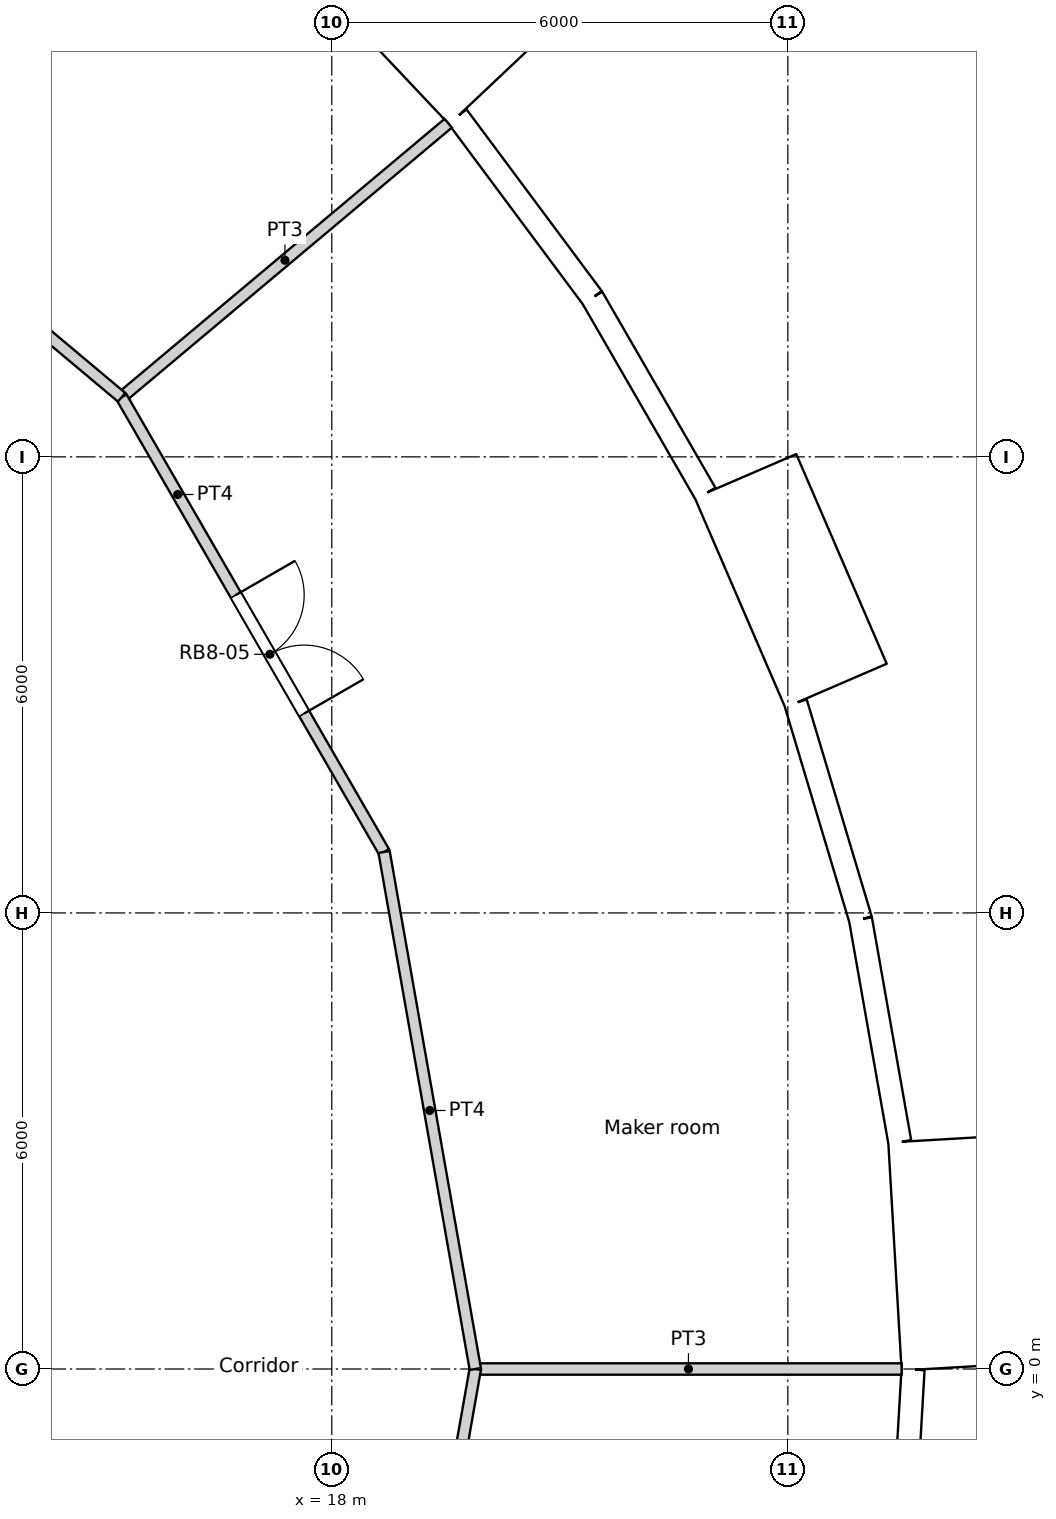
"""IFC4 building model, lengths in metres.
Left out: names, types, materials, properties, quantities, classifications, styles, units other than length and angle.
Written with IfcOpenShell. Run it as: python <this file> out.ifc"""

import sys

from ifc_helpers import new_model, si_unit, direction, frame, frame_2d, origin, origin_2d, place, context, subcontext, project, spatial, rectangle, circle, extrude, element, fill, save


model = new_model("IFC4")
c1 = context("Model", 3, precision=1e-05, world=origin(), true_north=direction((0.0, 1.0)))
c2 = subcontext(c1, "Body", "Model", "MODEL_VIEW")
j1 = project(units=[si_unit("LENGTHUNIT", "METRE"), si_unit("PLANEANGLEUNIT", "RADIAN")], contexts=[c1])
p1 = place(None, origin())
s1 = spatial("IfcSite", under=j1, at=p1, CompositionType="ELEMENT")
p2 = place(p1, origin())
s2 = spatial("IfcBuilding", under=s1, at=p2, CompositionType="ELEMENT")
p3 = place(p2, frame((0.0, 0.0, 201.6)))
s3 = spatial("IfcBuildingStorey", under=s2, at=p3, CompositionType="ELEMENT", Elevation=201.6)
for number, where, z_axis, x_axis in (
    (1, (24.548, 0.0, 0.0), (0.0, 0.0, 1.0), (1.0, 0.0, 0.0)),
    (2, (23.886, 5.661, 0.0), (0.0, 0.0, 1.0), (1.0, 0.0, 0.0)),
    (3, (21.937, 11.017, 0.0), (0.0, 0.0, 1.0), (1.0, 0.0, 0.0)),
    (4, (18.805, 15.779, 0.0), (0.0, 0.0, 1.0), (1.0, 0.0, 0.0)),
):
    element("IfcColumn", number, at=place(p3, frame(where, z_axis=z_axis, x_axis=x_axis)), inside=s3, PredefinedType="COLUMN", context=c2, shape_type="SweptSolid", body=[
        extrude(circle(Radius=0.6, at=origin_2d()), origin(), (0.0, 0.0, 1.0), 3.6),
    ])
for number, where, z_axis, x_axis in (
    (5, (18.822, 0.0, 0.0), (0.0, 0.0, 1.0), (1.0, 0.0, 0.0)),
    (6, (17.986, 5.548, 0.0), (0.0, 0.0, 1.0), (1.0, 0.0, 0.0)),
    (7, (15.552, 10.603, 0.0), (0.0, 0.0, 1.0), (1.0, 0.0, 0.0)),
):
    element("IfcColumn", number, at=place(p3, frame(where, z_axis=z_axis, x_axis=x_axis)), inside=s3, PredefinedType="COLUMN", context=c2, shape_type="SweptSolid", body=[
        extrude(circle(Radius=0.65, at=origin_2d()), origin(), (0.0, 0.0, 1.0), 3.6),
    ])
p4 = place(p3, frame((26.222, 0.025, -0.3), z_axis=(0.0, 0.0, 1.0), x_axis=(-0.058106596105, 0.998310384344, 0.0)))
e8 = element("IfcWall", 8, at=p4, inside=s3, PredefinedType="ELEMENTEDWALL", context=c2, shape_type="SweptSolid", body=[
    extrude(rectangle(XDim=3.0, YDim=1.45, at=frame_2d((1.5, 0.0))), origin(), (0.0, 0.0, 1.0), 3.6),
])
p5 = place(p4, frame((1.5, 0.0, 1.85)))
e9 = element("IfcOpeningElement", 9, at=p5, cuts=e8, PredefinedType="OPENING", context=c2, shape_type="SweptSolid", body=[
    extrude(circle(Radius=0.9, at=origin_2d()), frame((0.0, 0.735, 0.0), z_axis=(0.0, -1.0, 0.0), x_axis=(1.0, 0.0, 0.0)), (0.0, 0.0, 1.0), 1.47),
])
p6 = place(p3, frame((25.472, 2.987, 0.0), z_axis=(0.0, 0.0, 1.0), x_axis=(-0.173686952598, 0.984800915159, 0.0)))
e10 = element("IfcWall", 10, at=p6, inside=s3, PredefinedType="SOLIDWALL", context=c2, shape_type="SweptSolid", body=[
    extrude(rectangle(XDim=2.973, YDim=0.3, at=frame_2d((1.486, 0.0))), origin(), (0.0, 0.0, 1.0), 3.3),
])
p7 = place(p6, frame((1.486, 0.0, 1.55)))
e11 = element("IfcOpeningElement", 11, at=p7, cuts=e10, PredefinedType="OPENING", context=c2, shape_type="SweptSolid", body=[
    extrude(circle(Radius=0.9, at=origin_2d()), frame((0.0, 0.16, 0.0), z_axis=(0.0, -1.0, 0.0), x_axis=(1.0, 0.0, 0.0)), (0.0, 0.0, 1.0), 0.32),
])
p8 = place(p3, frame((24.956, 5.915, 0.0), z_axis=(0.0, 0.0, 1.0), x_axis=(-0.286782750849, 0.957995643944, 0.0)))
e12 = element("IfcWall", 12, at=p8, inside=s3, PredefinedType="SOLIDWALL", context=c2, shape_type="SweptSolid", body=[
    extrude(rectangle(XDim=2.973, YDim=0.3, at=frame_2d((1.486, 0.0))), origin(), (0.0, 0.0, 1.0), 3.3),
])
p9 = place(p8, frame((1.486, 0.0, 1.55)))
e13 = element("IfcOpeningElement", 13, at=p9, cuts=e12, PredefinedType="OPENING", context=c2, shape_type="SweptSolid", body=[
    extrude(circle(Radius=0.9, at=origin_2d()), frame((0.0, 0.16, 0.0), z_axis=(0.0, -1.0, 0.0), x_axis=(1.0, 0.0, 0.0)), (0.0, 0.0, 1.0), 0.32),
])
p10 = place(p3, frame((24.632, 8.992, -0.3), z_axis=(0.0, 0.0, 1.0), x_axis=(-0.396079003245, 0.918216435917, 0.0)))
e14 = element("IfcWall", 14, at=p10, inside=s3, PredefinedType="ELEMENTEDWALL", context=c2, shape_type="SweptSolid", body=[
    extrude(rectangle(XDim=3.0, YDim=1.45, at=frame_2d((1.5, 0.0))), origin(), (0.0, 0.0, 1.0), 3.6),
])
p11 = place(p10, frame((1.5, 0.0, 1.85)))
e15 = element("IfcOpeningElement", 15, at=p11, cuts=e14, PredefinedType="OPENING", context=c2, shape_type="SweptSolid", body=[
    extrude(circle(Radius=0.9, at=origin_2d()), frame((0.0, 0.735, 0.0), z_axis=(0.0, -1.0, 0.0), x_axis=(1.0, 0.0, 0.0)), (0.0, 0.0, 1.0), 1.47),
])
p12 = place(p3, frame((22.915, 11.519, 0.0), z_axis=(0.0, 0.0, 1.0), x_axis=(-0.499954672104, 0.866051572276, 0.0)))
e16 = element("IfcWall", 16, at=p12, inside=s3, PredefinedType="SOLIDWALL", context=c2, shape_type="SweptSolid", body=[
    extrude(rectangle(XDim=2.973, YDim=0.3, at=frame_2d((1.486, 0.0))), origin(), (0.0, 0.0, 1.0), 3.3),
])
p13 = place(p12, frame((1.486, 0.0, 1.55)))
e17 = element("IfcOpeningElement", 17, at=p13, cuts=e16, PredefinedType="OPENING", context=c2, shape_type="SweptSolid", body=[
    extrude(circle(Radius=0.9, at=origin_2d()), frame((0.0, 0.16, 0.0), z_axis=(0.0, -1.0, 0.0), x_axis=(1.0, 0.0, 0.0)), (0.0, 0.0, 1.0), 0.32),
])
p14 = place(p3, frame((21.428, 14.094, 0.0), z_axis=(0.0, 0.0, 1.0), x_axis=(-0.597197580538, 0.80209416517, 0.0)))
e18 = element("IfcWall", 18, at=p14, inside=s3, PredefinedType="SOLIDWALL", context=c2, shape_type="SweptSolid", body=[
    extrude(rectangle(XDim=2.973, YDim=0.3, at=frame_2d((1.486, 0.0))), origin(), (0.0, 0.0, 1.0), 3.3),
])
p15 = place(p14, frame((1.486, 0.0, 1.55)))
e19 = element("IfcOpeningElement", 19, at=p15, cuts=e18, PredefinedType="OPENING", context=c2, shape_type="SweptSolid", body=[
    extrude(circle(Radius=0.9, at=origin_2d()), frame((0.0, 0.16, 0.0), z_axis=(0.0, -1.0, 0.0), x_axis=(1.0, 0.0, 0.0)), (0.0, 0.0, 1.0), 0.32),
])
p16 = place(p3, frame((20.071, 16.874, -0.3), z_axis=(0.0, 0.0, 1.0), x_axis=(-0.686217177108, 0.727396718334, 0.0)))
e20 = element("IfcWall", 20, at=p16, inside=s3, PredefinedType="ELEMENTEDWALL", context=c2, shape_type="SweptSolid", body=[
    extrude(rectangle(XDim=3.0, YDim=1.45, at=frame_2d((1.5, 0.0))), origin(), (0.0, 0.0, 1.0), 3.6),
])
p17 = place(p16, frame((1.5, 0.0, 1.85)))
e21 = element("IfcOpeningElement", 21, at=p17, cuts=e20, PredefinedType="OPENING", context=c2, shape_type="SweptSolid", body=[
    extrude(circle(Radius=0.9, at=origin_2d()), frame((0.0, 0.735, 0.0), z_axis=(0.0, -1.0, 0.0), x_axis=(1.0, 0.0, 0.0)), (0.0, 0.0, 1.0), 1.47),
])
p18 = place(p3, frame((25.474, -2.978, 0.0), z_axis=(0.0, 0.0, 1.0), x_axis=(0.058139540521, 0.998308466271, 0.0)))
e22 = element("IfcWall", 22, at=p18, inside=s3, PredefinedType="SOLIDWALL", context=c2, shape_type="SweptSolid", body=[
    extrude(rectangle(XDim=2.973, YDim=0.3, at=frame_2d((1.487, 0.0))), origin(), (0.0, 0.0, 1.0), 3.3),
])
p19 = place(p18, frame((1.486, 0.0, 1.55)))
e23 = element("IfcOpeningElement", 23, at=p19, cuts=e22, PredefinedType="OPENING", context=c2, shape_type="SweptSolid", body=[
    extrude(circle(Radius=0.9, at=origin_2d()), frame((0.0, 0.16, 0.0), z_axis=(0.0, -1.0, 0.0), x_axis=(1.0, 0.0, 0.0)), (0.0, 0.0, 1.0), 0.32),
])
p20 = place(p3, frame((15.235, 12.784, 0.0), z_axis=(0.0, 0.0, 1.0), x_axis=(0.499914202267, -0.866074933462, 0.0)))
e24 = element("IfcWall", 24, at=p20, inside=s3, PredefinedType="PARTITIONING", context=c2, shape_type="SweptSolid", body=[
    extrude(rectangle(XDim=6.907, YDim=0.15, at=frame_2d((3.454, 0.0))), origin(), (0.0, 0.0, 1.0), 3.3),
])
p21 = place(p20, frame((3.004, 0.0, 0.0)))
e25 = element("IfcOpeningElement", 25, at=p21, cuts=e24, PredefinedType="OPENING", context=c2, shape_type="SweptSolid", body=[
    extrude(rectangle(XDim=1.8, YDim=2.1, at=frame_2d((0.9, 1.05))), frame((0.0, 0.075, 0.0), z_axis=(0.0, -1.0, 0.0), x_axis=(1.0, 0.0, 0.0)), (0.0, 0.0, 1.0), 0.15),
])
p22 = place(p3, frame((18.688, 6.802, 0.0), z_axis=(0.0, 0.0, 1.0), x_axis=(0.173728873845, -0.98479352069, 0.0)))
e26 = element("IfcWall", 26, at=p22, inside=s3, PredefinedType="PARTITIONING", context=c2, shape_type="SweptSolid", body=[
    extrude(rectangle(XDim=6.907, YDim=0.15, at=frame_2d((3.454, 0.0))), origin(), (0.0, 0.0, 1.0), 3.3),
])
p23 = place(p3, frame((9.943, 17.222, 0.0), z_axis=(0.0, 0.0, 1.0), x_axis=(0.766192104565, -0.642611592567, 0.0)))
e27 = element("IfcWall", 27, at=p23, inside=s3, PredefinedType="PARTITIONING", context=c2, shape_type="SweptSolid", body=[
    extrude(rectangle(XDim=6.906, YDim=0.15, at=frame_2d((3.453, 0.0))), origin(), (0.0, 0.0, 1.0), 3.3),
])
p24 = place(p3, frame((18.688, -6.802, 0.0), z_axis=(0.0, 0.0, 1.0), x_axis=(0.173728873845, 0.98479352069, 0.0)))
e28 = element("IfcWall", 28, at=p24, inside=s3, PredefinedType="PARTITIONING", context=c2, shape_type="SweptSolid", body=[
    extrude(rectangle(XDim=6.907, YDim=0.15, at=frame_2d((3.454, 0.0))), origin(), (0.0, 0.0, 1.0), 3.3),
])
p25 = place(p3, frame((15.235, 12.784, 0.0), z_axis=(0.0, 0.0, 1.0), x_axis=(0.76609059793, 0.642732600514, 0.0)))
e29 = element("IfcWall", 29, at=p25, inside=s3, PredefinedType="PARTITIONING", context=c2, shape_type="SweptSolid", body=[
    extrude(rectangle(XDim=5.609, YDim=0.15, at=frame_2d((2.804, 0.0))), origin(), (0.0, 0.0, 1.0), 3.3),
])
p26 = place(p3, frame((19.888, 0.0, 0.0), z_axis=(0.0, 0.0, 1.0), x_axis=(1.0, 0.0, 0.0)))
e30 = element("IfcWall", 30, at=p26, inside=s3, PredefinedType="PARTITIONING", context=c2, shape_type="SweptSolid", body=[
    extrude(rectangle(XDim=5.609, YDim=0.15, at=frame_2d((2.805, 0.0))), origin(), (0.0, 0.0, 1.0), 3.3),
])
p27 = place(p5, origin())
e31 = element("IfcWindow", 31, at=p27, inside=s3, PartitioningType="SINGLE_PANEL", PredefinedType="WINDOW", context=c2, shape_type="SweptSolid", body=[
    extrude(circle(Radius=0.9, at=origin_2d()), frame((0.0, 0.695, 0.0), z_axis=(0.0, -1.0, 0.0), x_axis=(1.0, 0.0, 0.0)), (0.0, 0.0, 1.0), 0.1),
])
fill(e9, e31)
p28 = place(p7, origin())
e32 = element("IfcWindow", 32, at=p28, inside=s3, PartitioningType="SINGLE_PANEL", PredefinedType="WINDOW", context=c2, shape_type="SweptSolid", body=[
    extrude(circle(Radius=0.9, at=origin_2d()), frame((0.0, 0.12, 0.0), z_axis=(0.0, -1.0, 0.0), x_axis=(1.0, 0.0, 0.0)), (0.0, 0.0, 1.0), 0.1),
])
fill(e11, e32)
p29 = place(p9, origin())
e33 = element("IfcWindow", 33, at=p29, inside=s3, PartitioningType="SINGLE_PANEL", PredefinedType="WINDOW", context=c2, shape_type="SweptSolid", body=[
    extrude(circle(Radius=0.9, at=origin_2d()), frame((0.0, 0.12, 0.0), z_axis=(0.0, -1.0, 0.0), x_axis=(1.0, 0.0, 0.0)), (0.0, 0.0, 1.0), 0.1),
])
fill(e13, e33)
p30 = place(p11, origin())
e34 = element("IfcWindow", 34, at=p30, inside=s3, PartitioningType="SINGLE_PANEL", PredefinedType="WINDOW", context=c2, shape_type="SweptSolid", body=[
    extrude(circle(Radius=0.9, at=origin_2d()), frame((0.0, 0.695, 0.0), z_axis=(0.0, -1.0, 0.0), x_axis=(1.0, 0.0, 0.0)), (0.0, 0.0, 1.0), 0.1),
])
fill(e15, e34)
p31 = place(p13, origin())
e35 = element("IfcWindow", 35, at=p31, inside=s3, PartitioningType="SINGLE_PANEL", PredefinedType="WINDOW", context=c2, shape_type="SweptSolid", body=[
    extrude(circle(Radius=0.9, at=origin_2d()), frame((0.0, 0.12, 0.0), z_axis=(0.0, -1.0, 0.0), x_axis=(1.0, 0.0, 0.0)), (0.0, 0.0, 1.0), 0.1),
])
fill(e17, e35)
p32 = place(p15, origin())
e36 = element("IfcWindow", 36, at=p32, inside=s3, PartitioningType="SINGLE_PANEL", PredefinedType="WINDOW", context=c2, shape_type="SweptSolid", body=[
    extrude(circle(Radius=0.9, at=origin_2d()), frame((0.0, 0.12, 0.0), z_axis=(0.0, -1.0, 0.0), x_axis=(1.0, 0.0, 0.0)), (0.0, 0.0, 1.0), 0.1),
])
fill(e19, e36)
p33 = place(p17, origin())
e37 = element("IfcWindow", 37, at=p33, inside=s3, PartitioningType="SINGLE_PANEL", PredefinedType="WINDOW", context=c2, shape_type="SweptSolid", body=[
    extrude(circle(Radius=0.9, at=origin_2d()), frame((0.0, 0.695, 0.0), z_axis=(0.0, -1.0, 0.0), x_axis=(1.0, 0.0, 0.0)), (0.0, 0.0, 1.0), 0.1),
])
fill(e21, e37)
p34 = place(p19, origin())
e38 = element("IfcWindow", 38, at=p34, inside=s3, PartitioningType="SINGLE_PANEL", PredefinedType="WINDOW", context=c2, shape_type="SweptSolid", body=[
    extrude(circle(Radius=0.9, at=origin_2d()), frame((0.0, 0.12, 0.0), z_axis=(0.0, -1.0, 0.0), x_axis=(1.0, 0.0, 0.0)), (0.0, 0.0, 1.0), 0.1),
])
fill(e23, e38)
p35 = place(p21, origin())
e39 = element("IfcDoor", 39, at=p35, inside=s3, OperationType="DOUBLE_DOOR_SINGLE_SWING", PredefinedType="DOOR", context=c2, shape_type="SweptSolid", body=[
    extrude(rectangle(XDim=1.8, YDim=2.1, at=frame_2d((0.9, 1.05))), frame((0.0, 0.025, 0.0), z_axis=(0.0, -1.0, 0.0), x_axis=(1.0, 0.0, 0.0)), (0.0, 0.0, 1.0), 0.05),
])
fill(e25, e39)
save(model, sys.argv[1])
